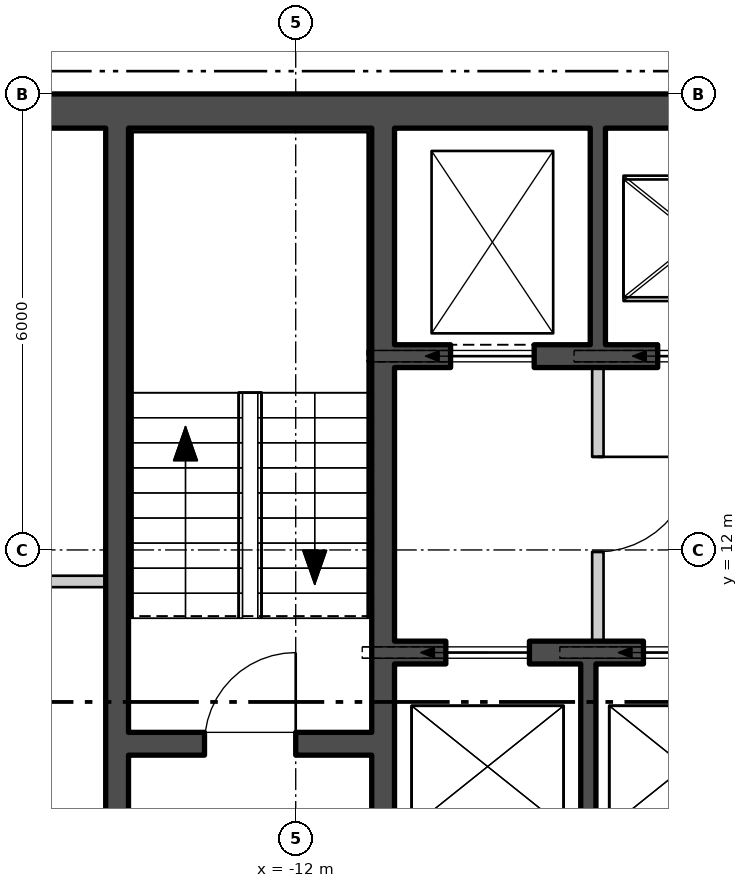
"""IFC4 building model, lengths in metres.
Left out: names, types, materials, properties, quantities, classifications, styles, units other than length and angle.
Written with IfcOpenShell. Run it as: python <this file> out.ifc"""

import sys

from ifc_helpers import new_model, si_unit, direction, frame, frame_2d, origin, place, context, subcontext, project, spatial, polyline, rectangle, outline, extrude, element, fill, save


model = new_model("IFC4")
c1 = context("Model", 3, precision=1e-05, world=origin(), true_north=direction((0.0, 1.0)))
c2 = subcontext(c1, "Body", "Model", "MODEL_VIEW")
j1 = project(units=[si_unit("LENGTHUNIT", "METRE"), si_unit("PLANEANGLEUNIT", "RADIAN")], contexts=[c1])
p1 = place(None, origin())
s1 = spatial("IfcSite", under=j1, at=p1, CompositionType="ELEMENT")
p2 = place(p1, origin())
s2 = spatial("IfcBuilding", under=s1, at=p2, CompositionType="ELEMENT")
p3 = place(p2, frame((0.0, 0.0, 239.4)))
s3 = spatial("IfcBuildingStorey", under=s2, at=p3, CompositionType="ELEMENT", Elevation=239.4)
p4 = place(p3, frame((-25.975, 14.597, -0.18), z_axis=(0.0, 0.0, 1.0), x_axis=(0.499999764979, -0.866025539474, 0.0)))
e1 = element("IfcWall", 1, at=p4, inside=s3, PredefinedType="SOLIDWALL", context=c2, shape_type="SweptSolid", body=[
    extrude(outline(polyline([(-0.13, -0.225), (45.87, -0.225), (45.61, 0.225), (0.13, 0.225), (-0.13, -0.225)])), origin(), (0.0, 0.0, 1.0), 6.0),
])
p5 = place(p4, frame((1.424, 0.0, 1.38)))
e2 = element("IfcOpeningElement", 2, at=p5, cuts=e1, PredefinedType="OPENING", context=c2, shape_type="SweptSolid", body=[
    extrude(rectangle(XDim=2.4, YDim=3.6, at=frame_2d((1.2, 1.8))), frame((0.0, 0.235, 0.0), z_axis=(0.0, -1.0, 0.0), x_axis=(1.0, 0.0, 0.0)), (0.0, 0.0, 1.0), 0.47),
])
p6 = place(p4, frame((5.893, 0.0, 1.38)))
e3 = element("IfcOpeningElement", 3, at=p6, cuts=e1, PredefinedType="OPENING", context=c2, shape_type="SweptSolid", body=[
    extrude(rectangle(XDim=2.4, YDim=3.6, at=frame_2d((1.2, 1.8))), frame((0.0, 0.235, 0.0), z_axis=(0.0, -1.0, 0.0), x_axis=(1.0, 0.0, 0.0)), (0.0, 0.0, 1.0), 0.47),
])
p7 = place(p4, frame((10.401, 0.0, 1.38)))
e4 = element("IfcOpeningElement", 4, at=p7, cuts=e1, PredefinedType="OPENING", context=c2, shape_type="SweptSolid", body=[
    extrude(rectangle(XDim=2.4, YDim=3.6, at=frame_2d((1.2, 1.8))), frame((0.0, 0.235, 0.0), z_axis=(0.0, -1.0, 0.0), x_axis=(1.0, 0.0, 0.0)), (0.0, 0.0, 1.0), 0.47),
])
p8 = place(p4, frame((14.909, 0.0, 1.38)))
e5 = element("IfcOpeningElement", 5, at=p8, cuts=e1, PredefinedType="OPENING", context=c2, shape_type="SweptSolid", body=[
    extrude(rectangle(XDim=2.4, YDim=3.6, at=frame_2d((1.2, 1.8))), frame((0.0, 0.235, 0.0), z_axis=(0.0, -1.0, 0.0), x_axis=(1.0, 0.0, 0.0)), (0.0, 0.0, 1.0), 0.47),
])
p9 = place(p4, frame((19.416, 0.0, 1.38)))
e6 = element("IfcOpeningElement", 6, at=p9, cuts=e1, PredefinedType="OPENING", context=c2, shape_type="SweptSolid", body=[
    extrude(rectangle(XDim=2.4, YDim=3.6, at=frame_2d((1.2, 1.8))), frame((0.0, 0.235, 0.0), z_axis=(0.0, -1.0, 0.0), x_axis=(1.0, 0.0, 0.0)), (0.0, 0.0, 1.0), 0.47),
])
p10 = place(p4, frame((23.924, 0.0, 1.38)))
e7 = element("IfcOpeningElement", 7, at=p10, cuts=e1, PredefinedType="OPENING", context=c2, shape_type="SweptSolid", body=[
    extrude(rectangle(XDim=2.4, YDim=3.6, at=frame_2d((1.2, 1.8))), frame((0.0, 0.235, 0.0), z_axis=(0.0, -1.0, 0.0), x_axis=(1.0, 0.0, 0.0)), (0.0, 0.0, 1.0), 0.47),
])
p11 = place(p4, frame((28.431, 0.0, 1.38)))
e8 = element("IfcOpeningElement", 8, at=p11, cuts=e1, PredefinedType="OPENING", context=c2, shape_type="SweptSolid", body=[
    extrude(rectangle(XDim=2.4, YDim=3.6, at=frame_2d((1.2, 1.8))), frame((0.0, 0.235, 0.0), z_axis=(0.0, -1.0, 0.0), x_axis=(1.0, 0.0, 0.0)), (0.0, 0.0, 1.0), 0.47),
])
p12 = place(p4, frame((32.939, 0.0, 1.38)))
e9 = element("IfcOpeningElement", 9, at=p12, cuts=e1, PredefinedType="OPENING", context=c2, shape_type="SweptSolid", body=[
    extrude(rectangle(XDim=2.4, YDim=3.6, at=frame_2d((1.2, 1.8))), frame((0.0, 0.235, 0.0), z_axis=(0.0, -1.0, 0.0), x_axis=(1.0, 0.0, 0.0)), (0.0, 0.0, 1.0), 0.47),
])
p13 = place(p4, frame((37.447, 0.0, 1.38)))
e10 = element("IfcOpeningElement", 10, at=p13, cuts=e1, PredefinedType="OPENING", context=c2, shape_type="SweptSolid", body=[
    extrude(rectangle(XDim=2.4, YDim=3.6, at=frame_2d((1.2, 1.8))), frame((0.0, 0.235, 0.0), z_axis=(0.0, -1.0, 0.0), x_axis=(1.0, 0.0, 0.0)), (0.0, 0.0, 1.0), 0.47),
])
p14 = place(p4, frame((41.916, 0.0, 1.38)))
e11 = element("IfcOpeningElement", 11, at=p14, cuts=e1, PredefinedType="OPENING", context=c2, shape_type="SweptSolid", body=[
    extrude(rectangle(XDim=2.4, YDim=3.6, at=frame_2d((1.2, 1.8))), frame((0.0, 0.235, 0.0), z_axis=(0.0, -1.0, 0.0), x_axis=(1.0, 0.0, 0.0)), (0.0, 0.0, 1.0), 0.47),
])
p15 = place(p3, frame((-16.2, 17.775, 0.0), z_axis=(0.0, 0.0, 1.0), x_axis=(1.0, 0.0, 0.0)))
e12 = element("IfcWall", 12, at=p15, inside=s3, PredefinedType="SHEAR", context=c2, shape_type="SweptSolid", body=[
    extrude(rectangle(XDim=32.4, YDim=0.45, at=frame_2d((16.2, 0.0))), origin(), (0.0, 0.0, 1.0), 5.8),
])
p16 = place(p3, frame((-10.85, 2.45, 0.0), z_axis=(0.0, 0.0, 1.0), x_axis=(0.0, 1.0, 0.0)))
e13 = element("IfcWall", 13, at=p16, inside=s3, PredefinedType="SHEAR", context=c2, shape_type="SweptSolid", body=[
    extrude(rectangle(XDim=15.1, YDim=0.3, at=frame_2d((7.55, 0.0))), origin(), (0.0, 0.0, 1.0), 5.8),
])
p17 = place(p16, frame((3.525, 0.0, 0.0)))
e14 = element("IfcOpeningElement", 14, at=p17, cuts=e13, PredefinedType="OPENING", context=c2, shape_type="SweptSolid", body=[
    extrude(rectangle(XDim=1.25, YDim=2.1, at=frame_2d((0.625, 1.05))), frame((0.0, 0.16, 0.0), z_axis=(0.0, -1.0, 0.0), x_axis=(1.0, 0.0, 0.0)), (0.0, 0.0, 1.0), 0.32),
])
p18 = place(p16, frame((1.15, 0.0, 0.0)))
e15 = element("IfcOpeningElement", 15, at=p18, cuts=e13, PredefinedType="OPENING", context=c2, shape_type="SweptSolid", body=[
    extrude(rectangle(XDim=1.0, YDim=2.1, at=frame_2d((0.5, 1.05))), frame((0.0, 0.16, 0.0), z_axis=(0.0, -1.0, 0.0), x_axis=(1.0, 0.0, 0.0)), (0.0, 0.0, 1.0), 0.32),
])
p19 = place(p3, frame((-14.35, 2.45, 0.0), z_axis=(0.0, 0.0, 1.0), x_axis=(0.0, 1.0, 0.0)))
e16 = element("IfcWall", 16, at=p19, inside=s3, PredefinedType="SHEAR", context=c2, shape_type="SweptSolid", body=[
    extrude(rectangle(XDim=15.1, YDim=0.3, at=frame_2d((7.55, 0.0))), origin(), (0.0, 0.0, 1.0), 5.8),
])
p20 = place(p19, frame((4.4, 0.0, 0.0)))
e17 = element("IfcOpeningElement", 17, at=p20, cuts=e16, PredefinedType="OPENING", context=c2, shape_type="SweptSolid", body=[
    extrude(rectangle(XDim=1.5, YDim=2.1, at=frame_2d((0.75, 1.05))), frame((0.0, 0.16, 0.0), z_axis=(0.0, -1.0, 0.0), x_axis=(1.0, 0.0, 0.0)), (0.0, 0.0, 1.0), 0.32),
])
p21 = place(p3, frame((-14.2, 9.45, 0.0), z_axis=(0.0, 0.0, 1.0), x_axis=(1.0, 0.0, 0.0)))
e18 = element("IfcWall", 18, at=p21, inside=s3, PredefinedType="SHEAR", context=c2, shape_type="SweptSolid", body=[
    extrude(rectangle(XDim=3.2, YDim=0.3, at=frame_2d((1.6, 0.0))), origin(), (0.0, 0.0, 1.0), 5.8),
])
p22 = place(p21, frame((1.0, 0.0, 0.0)))
e19 = element("IfcOpeningElement", 19, at=p22, cuts=e18, PredefinedType="OPENING", context=c2, shape_type="SweptSolid", body=[
    extrude(rectangle(XDim=1.2, YDim=2.1, at=frame_2d((0.6, 1.05))), frame((0.0, 0.16, 0.0), z_axis=(0.0, -1.0, 0.0), x_axis=(1.0, 0.0, 0.0)), (0.0, 0.0, 1.0), 0.32),
])
p23 = place(p3, frame((-10.7, 14.55, 0.0), z_axis=(0.0, 0.0, 1.0), x_axis=(1.0, 0.0, 0.0)))
e20 = element("IfcWall", 20, at=p23, inside=s3, PredefinedType="SHEAR", context=c2, shape_type="SweptSolid", body=[
    extrude(rectangle(XDim=21.4, YDim=0.3, at=frame_2d((10.7, 0.0))), origin(), (0.0, 0.0, 1.0), 5.8),
])
p24 = place(p23, frame((0.738, 0.0, 0.0)))
e21 = element("IfcOpeningElement", 21, at=p24, cuts=e20, PredefinedType="OPENING", context=c2, shape_type="SweptSolid", body=[
    extrude(rectangle(XDim=1.1, YDim=2.1, at=frame_2d((0.55, 1.05))), frame((0.0, 0.16, 0.0), z_axis=(0.0, -1.0, 0.0), x_axis=(1.0, 0.0, 0.0)), (0.0, 0.0, 1.0), 0.32),
])
p25 = place(p23, frame((3.462, 0.0, 0.0)))
e22 = element("IfcOpeningElement", 22, at=p25, cuts=e20, PredefinedType="OPENING", context=c2, shape_type="SweptSolid", body=[
    extrude(rectangle(XDim=1.1, YDim=2.1, at=frame_2d((0.55, 1.05))), frame((0.0, 0.16, 0.0), z_axis=(0.0, -1.0, 0.0), x_axis=(1.0, 0.0, 0.0)), (0.0, 0.0, 1.0), 0.32),
])
p26 = place(p23, frame((6.138, 0.0, 0.0)))
e23 = element("IfcOpeningElement", 23, at=p26, cuts=e20, PredefinedType="OPENING", context=c2, shape_type="SweptSolid", body=[
    extrude(rectangle(XDim=1.1, YDim=2.1, at=frame_2d((0.55, 1.05))), frame((0.0, 0.16, 0.0), z_axis=(0.0, -1.0, 0.0), x_axis=(1.0, 0.0, 0.0)), (0.0, 0.0, 1.0), 0.32),
])
p27 = place(p23, frame((8.812, 0.0, 0.0)))
e24 = element("IfcOpeningElement", 24, at=p27, cuts=e20, PredefinedType="OPENING", context=c2, shape_type="SweptSolid", body=[
    extrude(rectangle(XDim=1.1, YDim=2.1, at=frame_2d((0.55, 1.05))), frame((0.0, 0.16, 0.0), z_axis=(0.0, -1.0, 0.0), x_axis=(1.0, 0.0, 0.0)), (0.0, 0.0, 1.0), 0.32),
])
p28 = place(p23, frame((19.562, 0.0, 0.0)))
e25 = element("IfcOpeningElement", 25, at=p28, cuts=e20, PredefinedType="OPENING", context=c2, shape_type="SweptSolid", body=[
    extrude(rectangle(XDim=1.1, YDim=2.1, at=frame_2d((0.55, 1.05))), frame((0.0, 0.16, 0.0), z_axis=(0.0, -1.0, 0.0), x_axis=(1.0, 0.0, 0.0)), (0.0, 0.0, 1.0), 0.32),
])
p29 = place(p23, frame((14.213, 0.0, 0.0)))
e26 = element("IfcOpeningElement", 26, at=p29, cuts=e20, PredefinedType="OPENING", context=c2, shape_type="SweptSolid", body=[
    extrude(rectangle(XDim=1.0, YDim=2.1, at=frame_2d((0.5, 1.05))), frame((0.0, 0.16, 0.0), z_axis=(0.0, -1.0, 0.0), x_axis=(1.0, 0.0, 0.0)), (0.0, 0.0, 1.0), 0.32),
])
p30 = place(p3, frame((-10.7, 10.65, 0.0), z_axis=(0.0, 0.0, 1.0), x_axis=(1.0, 0.0, 0.0)))
e27 = element("IfcWall", 27, at=p30, inside=s3, PredefinedType="SHEAR", context=c2, shape_type="SweptSolid", body=[
    extrude(rectangle(XDim=10.3, YDim=0.3, at=frame_2d((5.15, 0.0))), origin(), (0.0, 0.0, 1.0), 5.8),
])
p31 = place(p30, frame((0.675, 0.0, 0.0)))
e28 = element("IfcOpeningElement", 28, at=p31, cuts=e27, PredefinedType="OPENING", context=c2, shape_type="SweptSolid", body=[
    extrude(rectangle(XDim=1.1, YDim=2.1, at=frame_2d((0.55, 1.05))), frame((0.0, 0.16, 0.0), z_axis=(0.0, -1.0, 0.0), x_axis=(1.0, 0.0, 0.0)), (0.0, 0.0, 1.0), 0.32),
])
p32 = place(p30, frame((3.275, 0.0, 0.0)))
e29 = element("IfcOpeningElement", 29, at=p32, cuts=e27, PredefinedType="OPENING", context=c2, shape_type="SweptSolid", body=[
    extrude(rectangle(XDim=1.1, YDim=2.1, at=frame_2d((0.55, 1.05))), frame((0.0, 0.16, 0.0), z_axis=(0.0, -1.0, 0.0), x_axis=(1.0, 0.0, 0.0)), (0.0, 0.0, 1.0), 0.32),
])
p33 = place(p30, frame((5.825, 0.0, 0.0)))
e30 = element("IfcOpeningElement", 30, at=p33, cuts=e27, PredefinedType="OPENING", context=c2, shape_type="SweptSolid", body=[
    extrude(rectangle(XDim=1.1, YDim=2.1, at=frame_2d((0.55, 1.05))), frame((0.0, 0.16, 0.0), z_axis=(0.0, -1.0, 0.0), x_axis=(1.0, 0.0, 0.0)), (0.0, 0.0, 1.0), 0.32),
])
p34 = place(p30, frame((8.425, 0.0, 0.0)))
e31 = element("IfcOpeningElement", 31, at=p34, cuts=e27, PredefinedType="OPENING", context=c2, shape_type="SweptSolid", body=[
    extrude(rectangle(XDim=1.0, YDim=2.1, at=frame_2d((0.5, 1.05))), frame((0.0, 0.16, 0.0), z_axis=(0.0, -1.0, 0.0), x_axis=(1.0, 0.0, 0.0)), (0.0, 0.0, 1.0), 0.32),
])
p35 = place(p3, frame((-8.025, 14.7, 0.0), z_axis=(0.0, 0.0, 1.0), x_axis=(0.0, 1.0, 0.0)))
e32 = element("IfcWall", 32, at=p35, inside=s3, PredefinedType="SHEAR", context=c2, shape_type="SweptSolid", body=[
    extrude(rectangle(XDim=2.85, YDim=0.2, at=frame_2d((1.425, 0.0))), origin(), (0.0, 0.0, 1.0), 5.8),
])
p36 = place(p3, frame((-8.15, 7.8, 0.0), z_axis=(0.0, 0.0, 1.0), x_axis=(0.0, 1.0, 0.0)))
e33 = element("IfcWall", 33, at=p36, inside=s3, PredefinedType="SHEAR", context=c2, shape_type="SweptSolid", body=[
    extrude(rectangle(XDim=2.7, YDim=0.2, at=frame_2d((1.35, 0.0))), origin(), (0.0, 0.0, 1.0), 5.8),
])
p37 = place(p3, frame((-8.025, 10.8, 0.0), z_axis=(0.0, 0.0, 1.0), x_axis=(0.0, 1.0, 0.0)))
e34 = element("IfcWall", 34, at=p37, inside=s3, PredefinedType="PARTITIONING", context=c2, shape_type="SweptSolid", body=[
    extrude(rectangle(XDim=3.6, YDim=0.15, at=frame_2d((1.8, 0.0))), origin(), (0.0, 0.0, 1.0), 5.8),
])
p38 = place(p37, frame((1.175, 0.0, 0.0)))
e35 = element("IfcOpeningElement", 35, at=p38, cuts=e34, PredefinedType="OPENING", context=c2, shape_type="SweptSolid", body=[
    extrude(rectangle(XDim=1.25, YDim=2.1, at=frame_2d((0.625, 1.05))), frame((0.0, 0.085, 0.0), z_axis=(0.0, -1.0, 0.0), x_axis=(1.0, 0.0, 0.0)), (0.0, 0.0, 1.0), 0.17),
])
p39 = place(p3, frame((-15.75, 11.586, 0.0), z_axis=(0.0, 0.0, 1.0), x_axis=(1.0, 0.0, 0.0)))
e36 = element("IfcWall", 36, at=p39, inside=s3, PredefinedType="PARTITIONING", context=c2, shape_type="SweptSolid", body=[
    extrude(rectangle(XDim=1.25, YDim=0.15, at=frame_2d((0.625, 0.0))), origin(), (0.0, 0.0, 1.0), 5.8),
])
p40 = place(p24, origin())
e37 = element("IfcDoor", 37, at=p40, inside=s3, OperationType="SLIDING_TO_LEFT", PredefinedType="DOOR", context=c2, shape_type="SweptSolid", body=[
    extrude(rectangle(XDim=1.1, YDim=2.1, at=frame_2d((0.55, 1.05))), frame((0.0, 0.025, 0.0), z_axis=(0.0, -1.0, 0.0), x_axis=(1.0, 0.0, 0.0)), (0.0, 0.0, 1.0), 0.05),
])
fill(e21, e37)
p41 = place(p25, origin())
e38 = element("IfcDoor", 38, at=p41, inside=s3, OperationType="SLIDING_TO_LEFT", PredefinedType="DOOR", context=c2, shape_type="SweptSolid", body=[
    extrude(rectangle(XDim=1.1, YDim=2.1, at=frame_2d((0.55, 1.05))), frame((0.0, 0.025, 0.0), z_axis=(0.0, -1.0, 0.0), x_axis=(1.0, 0.0, 0.0)), (0.0, 0.0, 1.0), 0.05),
])
fill(e22, e38)
p42 = place(p31, origin())
e39 = element("IfcDoor", 39, at=p42, inside=s3, OperationType="SLIDING_TO_LEFT", PredefinedType="DOOR", context=c2, shape_type="SweptSolid", body=[
    extrude(rectangle(XDim=1.1, YDim=2.1, at=frame_2d((0.55, 1.05))), frame((0.0, 0.025, 0.0), z_axis=(0.0, -1.0, 0.0), x_axis=(1.0, 0.0, 0.0)), (0.0, 0.0, 1.0), 0.05),
])
fill(e28, e39)
p43 = place(p32, origin())
e40 = element("IfcDoor", 40, at=p43, inside=s3, OperationType="SLIDING_TO_LEFT", PredefinedType="DOOR", context=c2, shape_type="SweptSolid", body=[
    extrude(rectangle(XDim=1.1, YDim=2.1, at=frame_2d((0.55, 1.05))), frame((0.0, 0.025, 0.0), z_axis=(0.0, -1.0, 0.0), x_axis=(1.0, 0.0, 0.0)), (0.0, 0.0, 1.0), 0.05),
])
fill(e29, e40)
p44 = place(p38, origin())
e41 = element("IfcDoor", 41, at=p44, inside=s3, OperationType="SINGLE_SWING_RIGHT", PredefinedType="DOOR", context=c2, shape_type="SweptSolid", body=[
    extrude(rectangle(XDim=1.25, YDim=2.1, at=frame_2d((0.625, 1.05))), frame((0.0, 0.025, 0.0), z_axis=(0.0, -1.0, 0.0), x_axis=(1.0, 0.0, 0.0)), (0.0, 0.0, 1.0), 0.05),
])
fill(e35, e41)
p45 = place(p22, origin())
e42 = element("IfcDoor", 42, at=p45, inside=s3, OperationType="SINGLE_SWING_LEFT", PredefinedType="DOOR", context=c2, shape_type="SweptSolid", body=[
    extrude(rectangle(XDim=1.2, YDim=2.1, at=frame_2d((0.6, 1.05))), frame((0.0, 0.025, 0.0), z_axis=(0.0, -1.0, 0.0), x_axis=(1.0, 0.0, 0.0)), (0.0, 0.0, 1.0), 0.05),
])
fill(e19, e42)
save(model, sys.argv[1])
